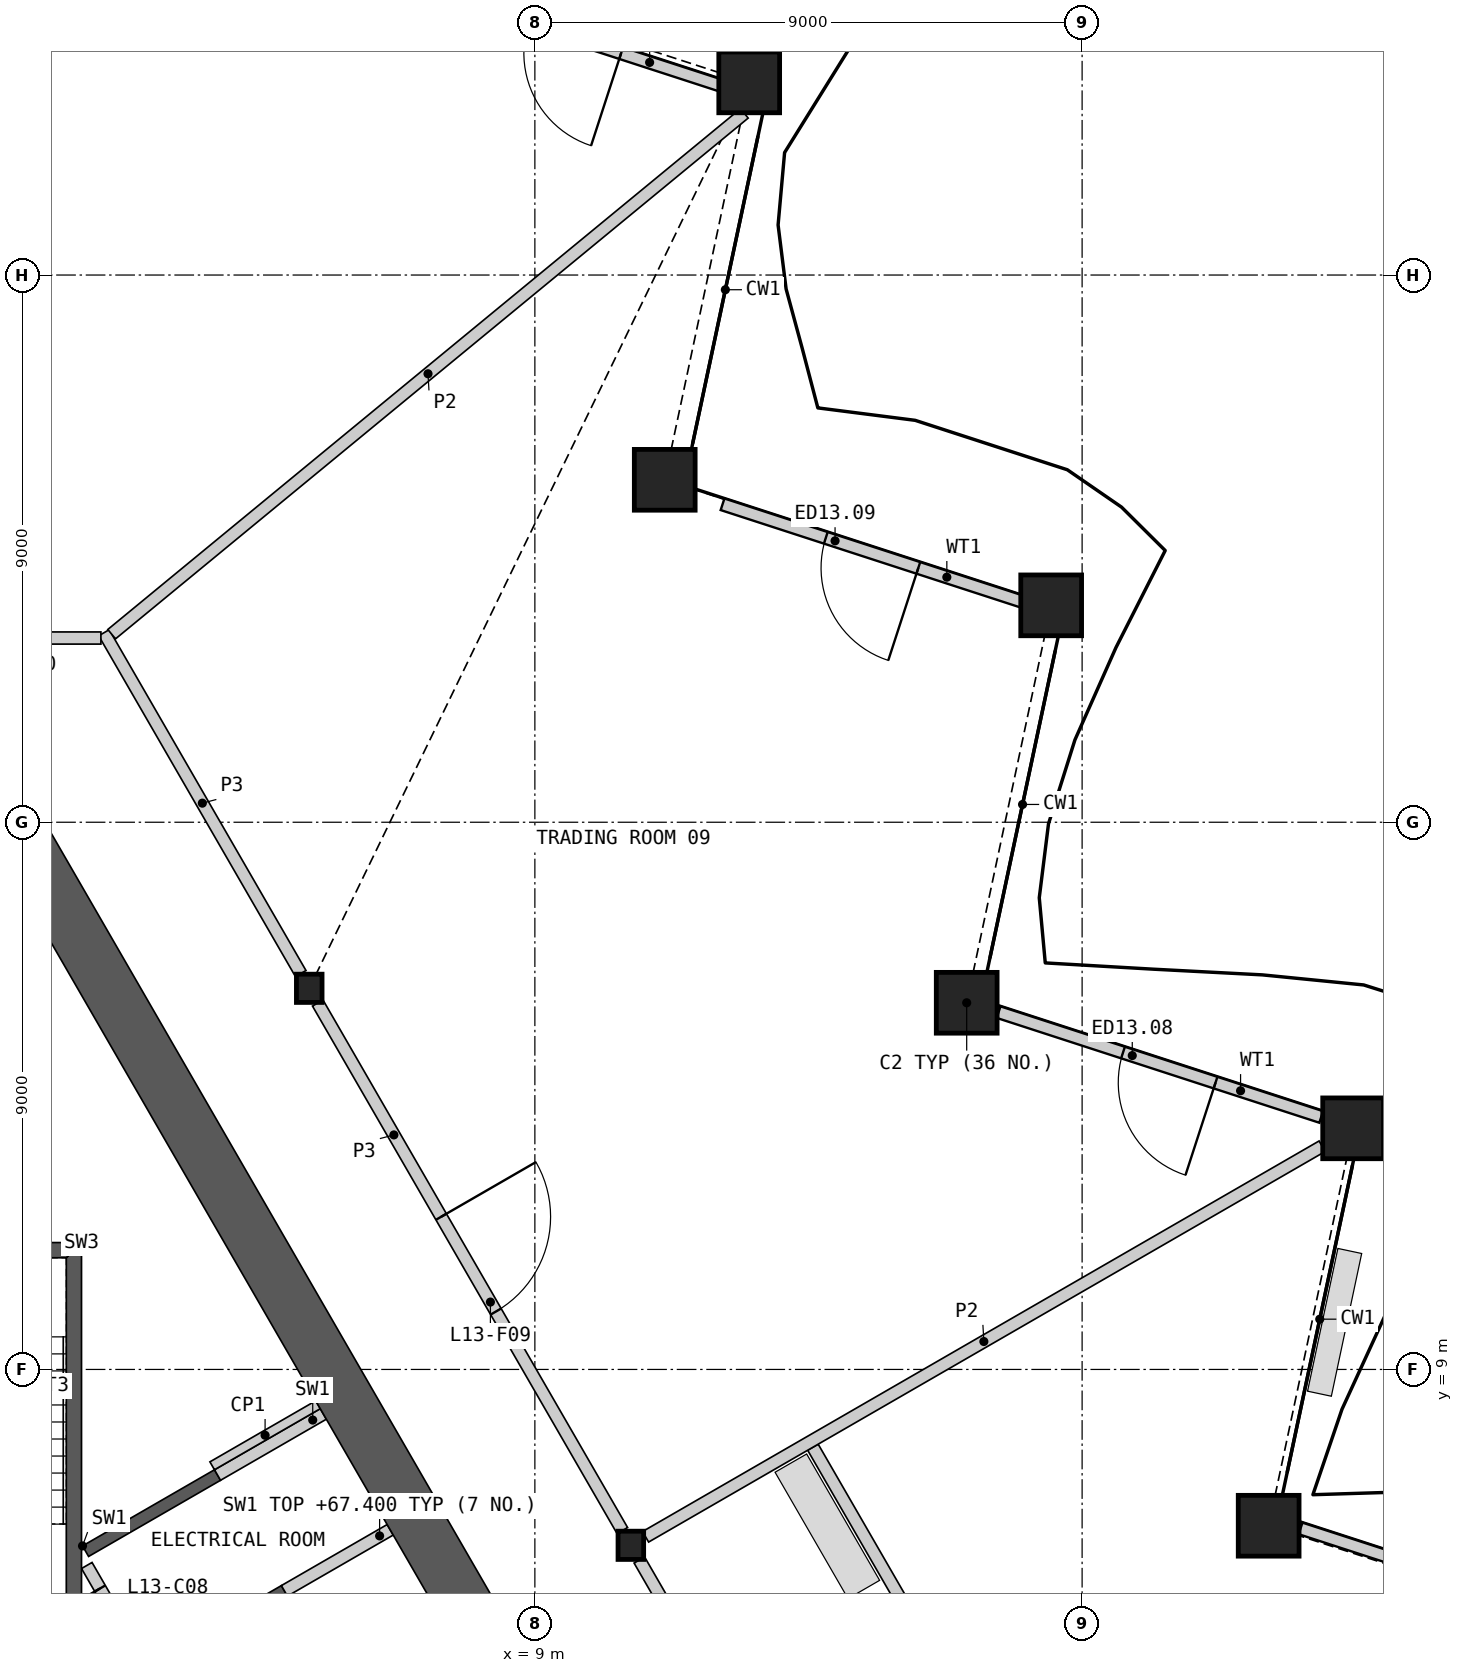
"""IFC4 building model, lengths in metres.
Left out: names, types, materials, properties, quantities, classifications, styles, units other than length and angle.
Written with IfcOpenShell. Run it as: python <this file> out.ifc"""

import sys

from ifc_helpers import new_model, si_unit, direction, frame, frame_2d, origin, origin_2d, place, context, subcontext, project, spatial, polyline, rectangle, hollow_rectangle, i_section, outline, extrude, element, fill, save


model = new_model("IFC4")
c1 = context("Model", 3, precision=1e-05, world=origin(), true_north=direction((0.0, 1.0)))
c2 = subcontext(c1, "Body", "Model", "MODEL_VIEW")
j1 = project(units=[si_unit("LENGTHUNIT", "METRE"), si_unit("PLANEANGLEUNIT", "RADIAN")], contexts=[c1])
p1 = place(None, origin())
s1 = spatial("IfcSite", under=j1, at=p1, CompositionType="ELEMENT")
p2 = place(p1, origin())
s2 = spatial("IfcBuilding", under=s1, at=p2, CompositionType="ELEMENT")
p3 = place(p2, frame((0.0, 0.0, 63.6)))
s3 = spatial("IfcBuildingStorey", under=s2, at=p3, CompositionType="ELEMENT", Elevation=63.6)
for number, where, z_axis, x_axis in (
    (1, (21.068, 6.429, 0.0), (0.0, 0.0, 1.0), (1.0, 0.0, 0.0)),
    (2, (22.457, 12.966, 0.0), (0.0, 0.0, 1.0), (1.0, 0.0, 0.0)),
    (3, (16.102, 15.031, 0.0), (0.0, 0.0, 1.0), (1.0, 0.0, 0.0)),
    (4, (17.491, 21.567, 0.0), (0.0, 0.0, 1.0), (1.0, 0.0, 0.0)),
    (5, (11.136, 23.632, 0.0), (0.0, 0.0, 1.0), (1.0, 0.0, 0.0)),
    (6, (12.525, 30.169, 0.0), (0.0, 0.0, 1.0), (1.0, 0.0, 0.0)),
):
    element("IfcColumn", number, at=place(p3, frame(where, z_axis=z_axis, x_axis=x_axis)), inside=s3, PredefinedType="COLUMN", context=c2, shape_type="SweptSolid", body=[
        extrude(hollow_rectangle(XDim=1.0, YDim=1.0, WallThickness=0.07, at=origin_2d()), origin(), (0.0, 0.0, 1.0), 4.2),
    ])
for number, where, z_axis, x_axis in (
    (7, (10.578, 6.107, 0.0), (0.0, 0.0, 1.0), (1.0, 0.0, 0.0)),
    (8, (5.289, 15.269, 0.0), (0.0, 0.0, 1.0), (1.0, 0.0, 0.0)),
):
    element("IfcColumn", number, at=place(p3, frame(where, z_axis=z_axis, x_axis=x_axis)), inside=s3, PredefinedType="COLUMN", context=c2, shape_type="SweptSolid", body=[
        extrude(i_section(OverallWidth=0.421, OverallDepth=0.465, WebThickness=0.045, FlangeThickness=0.072, at=origin_2d()), origin(), (0.0, 0.0, 1.0), 4.2),
    ])
p4 = place(p3, frame((26.899, 4.661, 0.0), z_axis=(0.0, 0.0, 1.0), x_axis=(-0.951054004345, 0.309024725255, 0.0)))
e9 = element("IfcWall", 9, at=p4, inside=s3, PredefinedType="SOLIDWALL", context=c2, shape_type="SweptSolid", body=[
    extrude(rectangle(XDim=5.579, YDim=0.2, at=frame_2d((2.79, 0.0))), origin(), (0.0, 0.0, 1.0), 3.189),
])
p5 = place(p4, frame((1.91, 0.0, 0.0)))
e10 = element("IfcOpeningElement", 10, at=p5, cuts=e9, PredefinedType="OPENING", context=c2, shape_type="SweptSolid", body=[
    extrude(rectangle(XDim=1.6, YDim=2.4, at=frame_2d((0.8, 1.2))), frame((0.0, 0.11, 0.0), z_axis=(0.0, -1.0, 0.0), x_axis=(1.0, 0.0, 0.0)), (0.0, 0.0, 1.0), 0.22),
])
p6 = place(p3, frame((21.933, 13.153, 0.0), z_axis=(0.0, 0.0, 1.0), x_axis=(-0.951066864375, 0.308985144444, 0.0)))
e11 = element("IfcWall", 11, at=p6, inside=s3, PredefinedType="SOLIDWALL", context=c2, shape_type="SweptSolid", body=[
    extrude(rectangle(XDim=5.579, YDim=0.2, at=frame_2d((2.79, 0.0))), origin(), (0.0, 0.0, 1.0), 3.189),
])
p7 = place(p6, frame((1.828, 0.0, 0.0)))
e12 = element("IfcOpeningElement", 12, at=p7, cuts=e11, PredefinedType="OPENING", context=c2, shape_type="SweptSolid", body=[
    extrude(rectangle(XDim=1.6, YDim=2.4, at=frame_2d((0.8, 1.2))), frame((0.0, 0.11, 0.0), z_axis=(0.0, -1.0, 0.0), x_axis=(1.0, 0.0, 0.0)), (0.0, 0.0, 1.0), 0.22),
])
p8 = place(p3, frame((17.005, 21.631, 0.0), z_axis=(0.0, 0.0, 1.0), x_axis=(-0.951045170621, 0.309051910588, 0.0)))
e13 = element("IfcWall", 13, at=p8, inside=s3, PredefinedType="SOLIDWALL", context=c2, shape_type="SweptSolid", body=[
    extrude(rectangle(XDim=5.171, YDim=0.2, at=frame_2d((2.585, 0.0))), origin(), (0.0, 0.0, 1.0), 3.189),
])
p9 = place(p8, frame((1.786, 0.0, 0.0)))
e14 = element("IfcOpeningElement", 14, at=p9, cuts=e13, PredefinedType="OPENING", context=c2, shape_type="SweptSolid", body=[
    extrude(rectangle(XDim=1.6, YDim=2.4, at=frame_2d((0.8, 1.2))), frame((0.0, 0.11, 0.0), z_axis=(0.0, -1.0, 0.0), x_axis=(1.0, 0.0, 0.0)), (0.0, 0.0, 1.0), 0.22),
])
p10 = place(p3, frame((12.117, 30.097, 0.0), z_axis=(0.0, 0.0, 1.0), x_axis=(-0.951063554534, 0.308995332064, 0.0)))
e15 = element("IfcWall", 15, at=p10, inside=s3, PredefinedType="SOLIDWALL", context=c2, shape_type="SweptSolid", body=[
    extrude(rectangle(XDim=5.171, YDim=0.2, at=frame_2d((2.586, 0.0))), origin(), (0.0, 0.0, 1.0), 3.189),
])
p11 = place(p10, frame((1.786, 0.0, 0.0)))
e16 = element("IfcOpeningElement", 16, at=p11, cuts=e15, PredefinedType="OPENING", context=c2, shape_type="SweptSolid", body=[
    extrude(rectangle(XDim=1.6, YDim=2.4, at=frame_2d((0.8, 1.2))), frame((0.0, 0.11, 0.0), z_axis=(0.0, -1.0, 0.0), x_axis=(1.0, 0.0, 0.0)), (0.0, 0.0, 1.0), 0.22),
])
p12 = place(p3, origin())
e17 = element("IfcWall", 17, at=p12, inside=s3, PredefinedType="SHEAR", context=c2, shape_type="SweptSolid", body=[
    extrude(outline(polyline([(1.561, 6.097), (3.731, 7.35), (3.831, 7.177), (1.66, 5.924), (1.561, 6.097)])), origin(), (0.0, 0.0, 1.0), 3.8),
])
p13 = place(p3, origin())
e18 = element("IfcWall", 18, at=p13, inside=s3, PredefinedType="SHEAR", context=c2, shape_type="SweptSolid", body=[
    extrude(outline(polyline([(2.66, 4.192), (4.831, 5.445), (8.231, -0.444), (6.061, -1.697), (5.96, -1.524), (7.952, -0.374), (6.952, 1.358), (4.96, 0.208), (4.861, 0.381), (6.852, 1.531), (5.852, 3.263), (3.861, 2.113), (3.76, 2.287), (5.752, 3.437), (4.752, 5.169), (2.76, 4.019), (2.66, 4.192)])), origin(), (0.0, 0.0, 1.0), 3.8),
])
p14 = place(p3, frame((5.817, -1.476, 0.0), z_axis=(0.0, 0.0, 1.0), x_axis=(-0.500002616675, 0.866023893041, 0.0)))
e19 = element("IfcWall", 19, at=p14, inside=s3, PredefinedType="SOLIDWALL", context=c2, shape_type="SweptSolid", body=[
    extrude(rectangle(XDim=8.373, YDim=0.2, at=frame_2d((4.187, 0.0))), origin(), (0.0, 0.0, 1.0), 3.8),
])
p15 = place(p14, frame((0.337, 0.0, 0.0)))
e20 = element("IfcOpeningElement", 20, at=p15, cuts=e19, PredefinedType="OPENING", context=c2, shape_type="SweptSolid", body=[
    extrude(rectangle(XDim=1.1, YDim=2.1, at=frame_2d((0.55, 1.05))), frame((0.0, 0.11, 0.0), z_axis=(0.0, -1.0, 0.0), x_axis=(1.0, 0.0, 0.0)), (0.0, 0.0, 1.0), 0.22),
])
p16 = place(p14, frame((2.537, 0.0, 0.0)))
e21 = element("IfcOpeningElement", 21, at=p16, cuts=e19, PredefinedType="OPENING", context=c2, shape_type="SweptSolid", body=[
    extrude(rectangle(XDim=1.1, YDim=2.1, at=frame_2d((0.55, 1.05))), frame((0.0, 0.11, 0.0), z_axis=(0.0, -1.0, 0.0), x_axis=(1.0, 0.0, 0.0)), (0.0, 0.0, 1.0), 0.22),
])
p17 = place(p14, frame((4.737, 0.0, 0.0)))
e22 = element("IfcOpeningElement", 22, at=p17, cuts=e19, PredefinedType="OPENING", context=c2, shape_type="SweptSolid", body=[
    extrude(rectangle(XDim=1.1, YDim=2.1, at=frame_2d((0.55, 1.05))), frame((0.0, 0.11, 0.0), z_axis=(0.0, -1.0, 0.0), x_axis=(1.0, 0.0, 0.0)), (0.0, 0.0, 1.0), 0.22),
])
p18 = place(p14, frame((7.037, 0.0, 0.0)))
e23 = element("IfcOpeningElement", 23, at=p18, cuts=e19, PredefinedType="OPENING", context=c2, shape_type="SweptSolid", body=[
    extrude(rectangle(XDim=0.9, YDim=2.1, at=frame_2d((0.45, 1.05))), frame((0.0, 0.11, 0.0), z_axis=(0.0, -1.0, 0.0), x_axis=(1.0, 0.0, 0.0)), (0.0, 0.0, 1.0), 0.22),
])
p19 = place(p3, frame((4.881, 5.358, 0.0), z_axis=(0.0, 0.0, 1.0), x_axis=(0.866035824272, 0.499981950752, 0.0)))
e24 = element("IfcWall", 24, at=p19, inside=s3, PredefinedType="SHEAR", context=c2, shape_type="SweptSolid", body=[
    extrude(rectangle(XDim=2.009, YDim=0.2, at=frame_2d((1.004, 0.0))), origin(), (0.0, 0.0, 1.0), 3.8),
])
p20 = place(p3, frame((3.781, 7.263, 0.0), z_axis=(0.0, 0.0, 1.0), x_axis=(0.865983199114, 0.50007309351, 0.0)))
e25 = element("IfcWall", 25, at=p20, inside=s3, PredefinedType="SHEAR", context=c2, shape_type="SweptSolid", body=[
    extrude(rectangle(XDim=2.009, YDim=0.2, at=frame_2d((1.004, 0.0))), origin(), (0.0, 0.0, 1.0), 3.8),
])
p21 = place(p3, origin())
e26 = element("IfcWall", 26, at=p21, inside=s3, PredefinedType="SHEAR", context=c2, shape_type="SweptSolid", body=[
    extrude(outline(polyline([(1.544, 5.237), (1.544, 11.087), (1.294, 10.837), (1.294, 5.237), (1.544, 5.237)])), origin(), (0.0, 0.0, 1.0), 3.8),
])
p22 = place(p3, origin())
e27 = element("IfcWall", 27, at=p22, inside=s3, PredefinedType="SHEAR", context=c2, shape_type="SweptSolid", body=[
    extrude(outline(polyline([(1.544, 11.087), (-1.544, 11.087), (-1.294, 10.837), (1.294, 10.837), (1.544, 11.087)])), origin(), (0.0, 0.0, 1.0), 3.8),
])
p23 = place(p3, frame((3.693, 7.415, 0.0), z_axis=(0.0, 0.0, 1.0), x_axis=(0.866035824272, 0.499981950752, 0.0)))
e28 = element("IfcWall", 28, at=p23, inside=s3, PredefinedType="PARTITIONING", context=c2, shape_type="SweptSolid", body=[
    extrude(rectangle(XDim=2.009, YDim=0.15, at=frame_2d((1.004, 0.0))), origin(), (0.0, 0.0, 1.0), 3.8),
])
p24 = place(p3, frame((8.16, 4.596, 0.0), z_axis=(0.0, 0.0, 1.0), x_axis=(-0.500009830349, 0.866019728156, 0.0)))
e29 = element("IfcWall", 29, at=p24, inside=s3, PredefinedType="SHEAR", context=c2, shape_type="SweptSolid", body=[
    extrude(rectangle(XDim=15.541, YDim=0.9, at=frame_2d((7.771, 0.0))), origin(), (0.0, 0.0, 1.0), 3.8),
])
p25 = place(p3, frame((5.429, 15.026, 0.0), z_axis=(0.0, 0.0, 1.0), x_axis=(0.50001002959, -0.86601961312, 0.0)))
e30 = element("IfcWall", 30, at=p25, inside=s3, PredefinedType="PARTITIONING", context=c2, shape_type="SweptSolid", body=[
    extrude(rectangle(XDim=10.019, YDim=0.2, at=frame_2d((5.009, 0.0))), origin(), (0.0, 0.0, 1.0), 3.8),
])
p26 = place(p25, frame((4.059, 0.0, 0.0)))
e31 = element("IfcOpeningElement", 31, at=p26, cuts=e30, PredefinedType="OPENING", context=c2, shape_type="SweptSolid", body=[
    extrude(rectangle(XDim=1.8, YDim=2.1, at=frame_2d((0.9, 1.05))), frame((0.0, 0.11, 0.0), z_axis=(0.0, -1.0, 0.0), x_axis=(1.0, 0.0, 0.0)), (0.0, 0.0, 1.0), 0.22),
])
p27 = place(p3, frame((10.719, 5.865, 0.0), z_axis=(0.0, 0.0, 1.0), x_axis=(0.49999175339, -0.866030164915, 0.0)))
e32 = element("IfcWall", 32, at=p27, inside=s3, PredefinedType="PARTITIONING", context=c2, shape_type="SweptSolid", body=[
    extrude(rectangle(XDim=10.019, YDim=0.2, at=frame_2d((5.009, 0.0))), origin(), (0.0, 0.0, 1.0), 3.8),
])
p28 = place(p27, frame((4.585, 0.0, 0.0)))
e33 = element("IfcOpeningElement", 33, at=p28, cuts=e32, PredefinedType="OPENING", context=c2, shape_type="SweptSolid", body=[
    extrude(rectangle(XDim=0.95, YDim=2.1, at=frame_2d((0.475, 1.05))), frame((0.0, 0.11, 0.0), z_axis=(0.0, -1.0, 0.0), x_axis=(1.0, 0.0, 0.0)), (0.0, 0.0, 1.0), 0.22),
])
p29 = place(p3, frame((1.913, 21.116, 0.0), z_axis=(0.0, 0.0, 1.0), x_axis=(0.500001069878, -0.866024786089, 0.0)))
e34 = element("IfcWall", 34, at=p29, inside=s3, PredefinedType="PARTITIONING", context=c2, shape_type="SweptSolid", body=[
    extrude(rectangle(XDim=6.473, YDim=0.2, at=frame_2d((3.236, 0.0))), origin(), (0.0, 0.0, 1.0), 3.8),
])
p30 = place(p3, frame((-1.863, 21.03, 0.0), z_axis=(0.0, 0.0, 1.0), x_axis=(1.0, 0.0, 0.0)))
e35 = element("IfcWall", 35, at=p30, inside=s3, PredefinedType="PARTITIONING", context=c2, shape_type="SweptSolid", body=[
    extrude(rectangle(XDim=3.726, YDim=0.2, at=frame_2d((1.863, 0.0))), origin(), (0.0, 0.0, 1.0), 3.8),
])
p31 = place(p30, frame((0.963, 0.0, 0.0)))
e36 = element("IfcOpeningElement", 36, at=p31, cuts=e35, PredefinedType="OPENING", context=c2, shape_type="SweptSolid", body=[
    extrude(rectangle(XDim=1.8, YDim=2.1, at=frame_2d((0.9, 1.05))), frame((0.0, 0.11, 0.0), z_axis=(0.0, -1.0, 0.0), x_axis=(1.0, 0.0, 0.0)), (0.0, 0.0, 1.0), 0.22),
])
p32 = place(p3, frame((13.573, 7.721, 0.0), z_axis=(0.0, 0.0, 1.0), x_axis=(0.499990262232, -0.866031025814, 0.0)))
e37 = element("IfcWall", 37, at=p32, inside=s3, PredefinedType="PARTITIONING", context=c2, shape_type="SweptSolid", body=[
    extrude(rectangle(XDim=17.597, YDim=0.2, at=frame_2d((8.799, 0.0))), origin(), (0.0, 0.0, 1.0), 2.885),
])
p33 = place(p32, frame((9.277, 0.0, 0.0)))
e38 = element("IfcOpeningElement", 38, at=p33, cuts=e37, PredefinedType="OPENING", context=c2, shape_type="SweptSolid", body=[
    extrude(rectangle(XDim=0.95, YDim=2.1, at=frame_2d((0.475, 1.05))), frame((0.0, 0.11, 0.0), z_axis=(0.0, -1.0, 0.0), x_axis=(1.0, 0.0, 0.0)), (0.0, 0.0, 1.0), 0.22),
])
p34 = place(p3, frame((2.04, 21.094, 0.0), z_axis=(0.0, 0.0, 1.0), x_axis=(0.772048928551, 0.635563098302, 0.0)))
e39 = element("IfcWall", 39, at=p34, inside=s3, PredefinedType="PARTITIONING", context=c2, shape_type="SweptSolid", body=[
    extrude(rectangle(XDim=13.477, YDim=0.2, at=frame_2d((6.738, 0.0))), origin(), (0.0, 0.0, 1.0), 2.885),
])
p35 = place(p3, frame((10.821, 6.247, 0.0), z_axis=(0.0, 0.0, 1.0), x_axis=(0.866026729935, 0.499997703033, 0.0)))
e40 = element("IfcWall", 40, at=p35, inside=s3, PredefinedType="PARTITIONING", context=c2, shape_type="SweptSolid", body=[
    extrude(rectangle(XDim=12.848, YDim=0.2, at=frame_2d((6.424, 0.0))), origin(), (0.0, 0.0, 1.0), 2.885),
])
p36 = place(p7, origin())
e41 = element("IfcDoor", 41, at=p36, inside=s3, OperationType="DOUBLE_DOOR_SINGLE_SWING", PredefinedType="DOOR", context=c2, shape_type="SweptSolid", body=[
    extrude(rectangle(XDim=1.6, YDim=2.4, at=frame_2d((0.8, 1.2))), frame((0.0, 0.025, 0.0), z_axis=(0.0, -1.0, 0.0), x_axis=(1.0, 0.0, 0.0)), (0.0, 0.0, 1.0), 0.05),
])
fill(e12, e41)
p37 = place(p9, origin())
e42 = element("IfcDoor", 42, at=p37, inside=s3, OperationType="DOUBLE_DOOR_SINGLE_SWING", PredefinedType="DOOR", context=c2, shape_type="SweptSolid", body=[
    extrude(rectangle(XDim=1.6, YDim=2.4, at=frame_2d((0.8, 1.2))), frame((0.0, 0.025, 0.0), z_axis=(0.0, -1.0, 0.0), x_axis=(1.0, 0.0, 0.0)), (0.0, 0.0, 1.0), 0.05),
])
fill(e14, e42)
p38 = place(p11, origin())
e43 = element("IfcDoor", 43, at=p38, inside=s3, OperationType="DOUBLE_DOOR_SINGLE_SWING", PredefinedType="DOOR", context=c2, shape_type="SweptSolid", body=[
    extrude(rectangle(XDim=1.6, YDim=2.4, at=frame_2d((0.8, 1.2))), frame((0.0, 0.025, 0.0), z_axis=(0.0, -1.0, 0.0), x_axis=(1.0, 0.0, 0.0)), (0.0, 0.0, 1.0), 0.05),
])
fill(e16, e43)
p39 = place(p18, origin())
e44 = element("IfcDoor", 44, at=p39, inside=s3, OperationType="SINGLE_SWING_RIGHT", PredefinedType="DOOR", context=c2, shape_type="SweptSolid", body=[
    extrude(rectangle(XDim=0.9, YDim=2.1, at=frame_2d((0.45, 1.05))), frame((0.0, 0.025, 0.0), z_axis=(0.0, -1.0, 0.0), x_axis=(1.0, 0.0, 0.0)), (0.0, 0.0, 1.0), 0.05),
])
fill(e23, e44)
p40 = place(p26, origin())
e45 = element("IfcDoor", 45, at=p40, inside=s3, OperationType="DOUBLE_DOOR_SINGLE_SWING", PredefinedType="DOOR", context=c2, shape_type="SweptSolid", body=[
    extrude(rectangle(XDim=1.8, YDim=2.1, at=frame_2d((0.9, 1.05))), frame((0.0, 0.025, 0.0), z_axis=(0.0, -1.0, 0.0), x_axis=(1.0, 0.0, 0.0)), (0.0, 0.0, 1.0), 0.05),
])
fill(e31, e45)
save(model, sys.argv[1])
